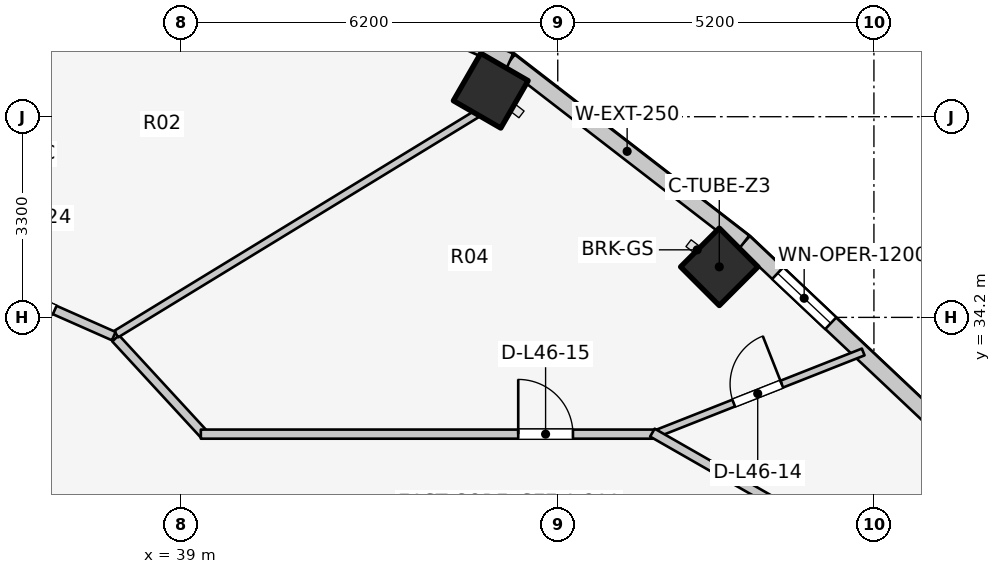
"""IFC4 building model, lengths in metres.
Left out: names, types, materials, properties, quantities, classifications, styles, units other than length and angle.
Written with IfcOpenShell. Run it as: python <this file> out.ifc"""

import sys

from ifc_helpers import new_model, si_unit, direction, frame, frame_2d, origin, origin_2d, place, context, subcontext, project, spatial, rectangle, extrude, element, fill, save


model = new_model("IFC4")
c1 = context("Model", 3, precision=1e-05, world=origin(), true_north=direction((0.0, 1.0)))
c2 = subcontext(c1, "Body", "Model", "MODEL_VIEW")
j1 = project(units=[si_unit("LENGTHUNIT", "METRE"), si_unit("PLANEANGLEUNIT", "RADIAN")], contexts=[c1])
p1 = place(None, origin())
s1 = spatial("IfcSite", under=j1, at=p1, CompositionType="ELEMENT")
p2 = place(p1, origin())
s2 = spatial("IfcBuilding", under=s1, at=p2, CompositionType="ELEMENT")
p3 = place(p2, frame((0.0, 0.0, 152.9)))
s3 = spatial("IfcBuildingStorey", under=s2, at=p3, CompositionType="ELEMENT", Elevation=152.9)
for number, where, z_axis, x_axis in (
    (1, (47.857, 35.031, 0.0), (0.0, 0.0, 1.0), (0.707, 0.707, 0.0)),
    (2, (44.098, 37.928, 0.0), (0.0, 0.0, 1.0), (0.5, 0.866, 0.0)),
):
    element("IfcColumn", number, at=place(p3, frame(where, z_axis=z_axis, x_axis=x_axis)), inside=s3, PredefinedType="COLUMN", context=c2, shape_type="SweptSolid", body=[
        extrude(rectangle(XDim=0.9, YDim=0.9, at=origin_2d()), origin(), (0.0, 0.0, 1.0), 3.1),
    ])
p4 = place(p3, frame((51.619, 32.284, 0.0), z_axis=(0.0, 0.0, 1.0), x_axis=(-0.727667301037, 0.68593024354, 0.0)))
e3 = element("IfcWall", 3, at=p4, inside=s3, PredefinedType="STANDARD", context=c2, shape_type="SweptSolid", body=[
    extrude(rectangle(XDim=4.604, YDim=0.26, at=frame_2d((2.302, 0.0))), origin(), (0.0, 0.0, 1.0), 2.85),
])
p5 = place(p4, frame((2.652, 0.0, 0.75)))
e4 = element("IfcOpeningElement", 4, at=p5, cuts=e3, PredefinedType="OPENING", context=c2, shape_type="SweptSolid", body=[
    extrude(rectangle(XDim=1.2, YDim=1.5, at=frame_2d((0.6, 0.75))), frame((0.0, 0.14, 0.0), z_axis=(0.0, -1.0, 0.0), x_axis=(1.0, 0.0, 0.0)), (0.0, 0.0, 1.0), 0.28),
])
p6 = place(p3, frame((48.269, 35.441, 0.0), z_axis=(0.0, 0.0, 1.0), x_axis=(-0.791460185804, 0.611220724687, 0.0)))
e5 = element("IfcWall", 5, at=p6, inside=s3, PredefinedType="STANDARD", context=c2, shape_type="SweptSolid", body=[
    extrude(rectangle(XDim=4.872, YDim=0.26, at=frame_2d((2.436, 0.0))), origin(), (0.0, 0.0, 1.0), 2.85),
])
p7 = place(p3, frame((44.413, 38.419, 0.0), z_axis=(0.0, 0.0, 1.0), x_axis=(-0.912353637112, 0.409403029847, 0.0)))
e6 = element("IfcWall", 6, at=p7, inside=s3, PredefinedType="STANDARD", context=c2, shape_type="SweptSolid", body=[
    extrude(rectangle(XDim=5.533, YDim=0.26, at=frame_2d((2.766, 0.0))), origin(), (0.0, 0.0, 1.0), 2.85),
])
p8 = place(p7, frame((2.016, 0.0, 0.75)))
e7 = element("IfcOpeningElement", 7, at=p8, cuts=e6, PredefinedType="OPENING", context=c2, shape_type="SweptSolid", body=[
    extrude(rectangle(XDim=1.5, YDim=1.6, at=frame_2d((0.75, 0.8))), frame((0.0, 0.14, 0.0), z_axis=(0.0, -1.0, 0.0), x_axis=(1.0, 0.0, 0.0)), (0.0, 0.0, 1.0), 0.28),
])
p9 = place(p3, frame((46.753, 32.262, 0.0), z_axis=(0.0, 0.0, 1.0), x_axis=(0.930204027108, 0.367042869367, 0.0)))
e8 = element("IfcWall", 8, at=p9, inside=s3, PredefinedType="MOVABLE", context=c2, shape_type="SweptSolid", body=[
    extrude(rectangle(XDim=3.731, YDim=0.12, at=frame_2d((1.865, 0.0))), origin(), (0.0, 0.0, 1.0), 2.22),
])
p10 = place(p9, frame((1.44, 0.0, 0.0)))
e9 = element("IfcOpeningElement", 9, at=p10, cuts=e8, PredefinedType="OPENING", context=c2, shape_type="SweptSolid", body=[
    extrude(rectangle(XDim=0.85, YDim=2.05, at=frame_2d((0.425, 1.025))), frame((0.0, 0.07, 0.0), z_axis=(0.0, -1.0, 0.0), x_axis=(1.0, 0.0, 0.0)), (0.0, 0.0, 1.0), 0.14),
])
p11 = place(p3, frame((37.928, 33.856, 0.0), z_axis=(0.0, 0.0, 1.0), x_axis=(0.677579737957, -0.735449317567, 0.0)))
e10 = element("IfcWall", 10, at=p11, inside=s3, PredefinedType="PARTITIONING", context=c2, shape_type="SweptSolid", body=[
    extrude(rectangle(XDim=2.173, YDim=0.15, at=frame_2d((1.086, 0.0))), origin(), (0.0, 0.0, 1.0), 2.299),
])
p12 = place(p3, frame((39.33, 32.28, 0.0), z_axis=(0.0, 0.0, 1.0), x_axis=(1.0, 0.0, 0.0)))
e11 = element("IfcWall", 11, at=p12, inside=s3, PredefinedType="PARTITIONING", context=c2, shape_type="SweptSolid", body=[
    extrude(rectangle(XDim=7.52, YDim=0.15, at=frame_2d((3.76, 0.0))), origin(), (0.0, 0.0, 1.0), 2.299),
])
p13 = place(p12, frame((5.22, 0.0, 0.0)))
e12 = element("IfcOpeningElement", 12, at=p13, cuts=e11, PredefinedType="OPENING", context=c2, shape_type="SweptSolid", body=[
    extrude(rectangle(XDim=0.9, YDim=2.1, at=frame_2d((0.45, 1.05))), frame((0.0, 0.085, 0.0), z_axis=(0.0, -1.0, 0.0), x_axis=(1.0, 0.0, 0.0)), (0.0, 0.0, 1.0), 0.17),
])
p14 = place(p3, frame((46.757, 32.305, 0.0), z_axis=(0.0, 0.0, 1.0), x_axis=(0.867991349648, -0.496579315857, 0.0)))
e13 = element("IfcWall", 13, at=p14, inside=s3, PredefinedType="PARTITIONING", context=c2, shape_type="SweptSolid", body=[
    extrude(rectangle(XDim=2.567, YDim=0.15, at=frame_2d((1.283, 0.0))), origin(), (0.0, 0.0, 1.0), 2.22),
])
p15 = place(p3, frame((37.938, 33.925, 0.0), z_axis=(0.0, 0.0, 1.0), x_axis=(0.853440334679, 0.521190555501, 0.0)))
e14 = element("IfcWall", 14, at=p15, inside=s3, PredefinedType="PARTITIONING", context=c2, shape_type="SweptSolid", body=[
    extrude(rectangle(XDim=6.966, YDim=0.125, at=frame_2d((3.483, 0.0))), origin(), (0.0, 0.0, 1.0), 2.299),
])
p16 = place(p3, frame((37.898, 33.892, 0.0), z_axis=(0.0, 0.0, 1.0), x_axis=(-0.914519212393, 0.40454247016, 0.0)))
e15 = element("IfcWall", 15, at=p16, inside=s3, PredefinedType="PARTITIONING", context=c2, shape_type="SweptSolid", body=[
    extrude(rectangle(XDim=3.124, YDim=0.15, at=frame_2d((1.562, 0.0))), origin(), (0.0, 0.0, 1.0), 2.299),
])
p17 = place(p16, frame((1.062, 0.0, 0.0)))
e16 = element("IfcOpeningElement", 16, at=p17, cuts=e15, PredefinedType="OPENING", context=c2, shape_type="SweptSolid", body=[
    extrude(rectangle(XDim=1.0, YDim=2.1, at=frame_2d((0.5, 1.05))), frame((0.0, 0.085, 0.0), z_axis=(0.0, -1.0, 0.0), x_axis=(1.0, 0.0, 0.0)), (0.0, 0.0, 1.0), 0.17),
])
p18 = place(p5, origin())
e17 = element("IfcWindow", 17, at=p18, inside=s3, PartitioningType="SINGLE_PANEL", PredefinedType="WINDOW", context=c2, shape_type="SweptSolid", body=[
    extrude(rectangle(XDim=1.2, YDim=1.5, at=frame_2d((0.6, 0.75))), frame((0.0, 0.03, 0.0), z_axis=(0.0, -1.0, 0.0), x_axis=(1.0, 0.0, 0.0)), (0.0, 0.0, 1.0), 0.06),
])
fill(e4, e17)
p19 = place(p10, origin())
e18 = element("IfcDoor", 18, at=p19, inside=s3, OperationType="SINGLE_SWING_RIGHT", PredefinedType="DOOR", context=c2, shape_type="SweptSolid", body=[
    extrude(rectangle(XDim=0.85, YDim=2.05, at=frame_2d((0.425, 1.025))), frame((0.0, 0.025, 0.0), z_axis=(0.0, -1.0, 0.0), x_axis=(1.0, 0.0, 0.0)), (0.0, 0.0, 1.0), 0.05),
])
fill(e9, e18)
p20 = place(p13, origin())
e19 = element("IfcDoor", 19, at=p20, inside=s3, OperationType="SINGLE_SWING_LEFT", PredefinedType="DOOR", context=c2, shape_type="SweptSolid", body=[
    extrude(rectangle(XDim=0.9, YDim=2.1, at=frame_2d((0.45, 1.05))), frame((0.0, 0.025, 0.0), z_axis=(0.0, -1.0, 0.0), x_axis=(1.0, 0.0, 0.0)), (0.0, 0.0, 1.0), 0.05),
])
fill(e12, e19)
p21 = place(p17, origin())
e20 = element("IfcDoor", 20, at=p21, inside=s3, OperationType="SINGLE_SWING_RIGHT", PredefinedType="DOOR", context=c2, shape_type="SweptSolid", body=[
    extrude(rectangle(XDim=1.0, YDim=2.1, at=frame_2d((0.5, 1.05))), frame((0.0, 0.025, 0.0), z_axis=(0.0, -1.0, 0.0), x_axis=(1.0, 0.0, 0.0)), (0.0, 0.0, 1.0), 0.05),
])
fill(e16, e20)
save(model, sys.argv[1])
